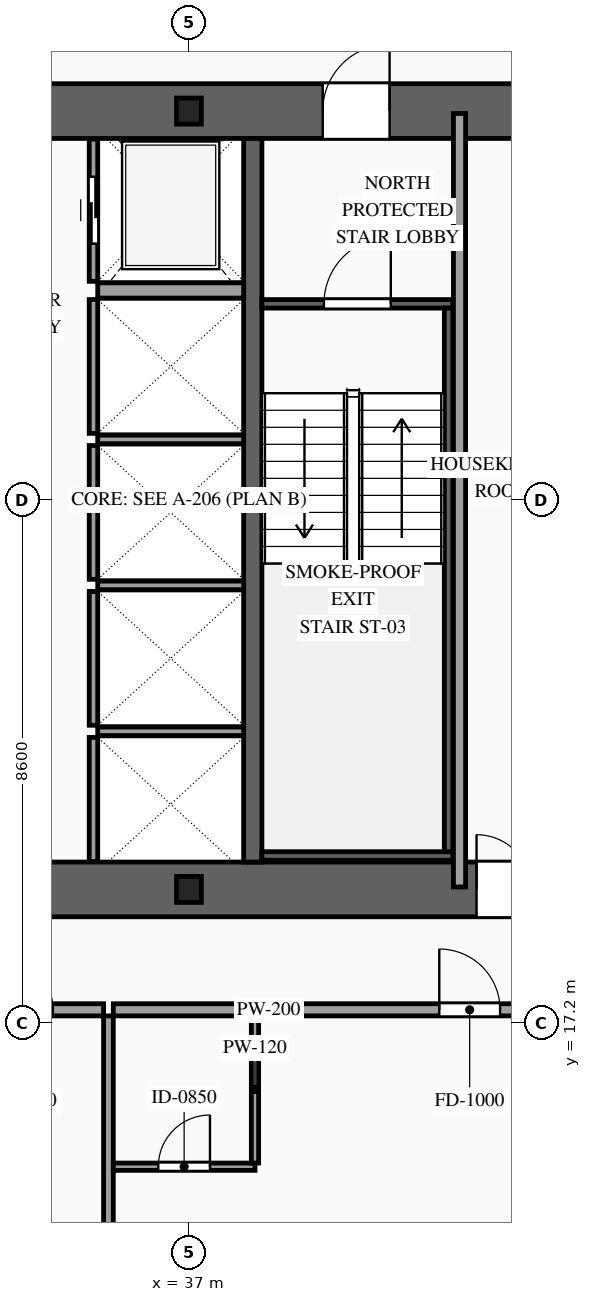
"""IFC4 building model, lengths in metres.
Left out: names, types, materials, properties, quantities, classifications, styles, units other than length and angle.
Written with IfcOpenShell. Run it as: python <this file> out.ifc"""

import sys

from ifc_helpers import new_model, si_unit, direction, frame, frame_2d, origin, origin_2d, place, context, subcontext, project, spatial, rectangle, i_section, extrude, source, transform, mapped, element, fill, save


model = new_model("IFC4")
c1 = context("Model", 3, precision=1e-05, world=origin(), true_north=direction((0.0, 1.0)))
c2 = subcontext(c1, "Body", "Model", "MODEL_VIEW")
j1 = project(units=[si_unit("LENGTHUNIT", "METRE"), si_unit("PLANEANGLEUNIT", "RADIAN")], contexts=[c1])
p1 = place(None, origin())
s1 = spatial("IfcSite", under=j1, at=p1, CompositionType="ELEMENT")
p2 = place(p1, origin())
s2 = spatial("IfcBuilding", under=s1, at=p2, CompositionType="ELEMENT")
p3 = place(p2, frame((0.0, 0.0, 64.0)))
s3 = spatial("IfcBuildingStorey", under=s2, at=p3, CompositionType="ELEMENT", Elevation=64.0)
p4 = place(p3, frame((23.35, 19.4, 0.0), z_axis=(0.0, 0.0, 1.0), x_axis=(1.0, 0.0, 0.0)))
e1 = element("IfcWall", 1, at=p4, inside=s3, PredefinedType="SHEAR", context=c2, shape_type="SweptSolid", body=[
    extrude(rectangle(XDim=27.3, YDim=0.9, at=frame_2d((13.65, 0.0))), origin(), (0.0, 0.0, 1.0), 3.6),
])
p5 = place(p4, frame((2.1, 0.0, 0.0)))
e2 = element("IfcOpeningElement", 2, at=p5, cuts=e1, PredefinedType="OPENING", context=c2, shape_type="SweptSolid", body=[
    extrude(rectangle(XDim=1.1, YDim=2.2, at=frame_2d((0.55, 1.1))), frame((0.0, 0.465, 0.0), z_axis=(0.0, -1.0, 0.0), x_axis=(1.0, 0.0, 0.0)), (0.0, 0.0, 1.0), 0.93),
])
p6 = place(p4, frame((10.0, 0.0, 0.0)))
e3 = element("IfcOpeningElement", 3, at=p6, cuts=e1, PredefinedType="OPENING", context=c2, shape_type="SweptSolid", body=[
    extrude(rectangle(XDim=1.1, YDim=2.2, at=frame_2d((0.55, 1.1))), frame((0.0, 0.465, 0.0), z_axis=(0.0, -1.0, 0.0), x_axis=(1.0, 0.0, 0.0)), (0.0, 0.0, 1.0), 0.93),
])
p7 = place(p4, frame((23.2, 0.0, 0.0)))
e4 = element("IfcOpeningElement", 4, at=p7, cuts=e1, PredefinedType="OPENING", context=c2, shape_type="SweptSolid", body=[
    extrude(rectangle(XDim=1.1, YDim=2.2, at=frame_2d((0.55, 1.1))), frame((0.0, 0.465, 0.0), z_axis=(0.0, -1.0, 0.0), x_axis=(1.0, 0.0, 0.0)), (0.0, 0.0, 1.0), 0.93),
])
p8 = place(p4, frame((19.82, 0.0, 0.0)))
e5 = element("IfcOpeningElement", 5, at=p8, cuts=e1, PredefinedType="OPENING", context=c2, shape_type="SweptSolid", body=[
    extrude(rectangle(XDim=0.9, YDim=2.15, at=frame_2d((0.45, 1.075))), frame((0.0, 0.465, 0.0), z_axis=(0.0, -1.0, 0.0), x_axis=(1.0, 0.0, 0.0)), (0.0, 0.0, 1.0), 0.93),
])
p9 = place(p4, frame((18.38, 0.0, 0.0)))
e6 = element("IfcOpeningElement", 6, at=p9, cuts=e1, PredefinedType="OPENING", context=c2, shape_type="SweptSolid", body=[
    extrude(rectangle(XDim=0.9, YDim=2.15, at=frame_2d((0.45, 1.075))), frame((0.0, 0.465, 0.0), z_axis=(0.0, -1.0, 0.0), x_axis=(1.0, 0.0, 0.0)), (0.0, 0.0, 1.0), 0.93),
])
p10 = place(p3, frame((23.35, 32.2, 0.0), z_axis=(0.0, 0.0, 1.0), x_axis=(1.0, 0.0, 0.0)))
e7 = element("IfcWall", 7, at=p10, inside=s3, PredefinedType="SHEAR", context=c2, shape_type="SweptSolid", body=[
    extrude(rectangle(XDim=27.3, YDim=0.9, at=frame_2d((13.65, 0.0))), origin(), (0.0, 0.0, 1.0), 3.6),
])
p11 = place(p10, frame((4.72, 0.0, 0.0)))
e8 = element("IfcOpeningElement", 8, at=p11, cuts=e7, PredefinedType="OPENING", context=c2, shape_type="SweptSolid", body=[
    extrude(rectangle(XDim=0.9, YDim=2.15, at=frame_2d((0.45, 1.075))), frame((0.0, 0.465, 0.0), z_axis=(0.0, -1.0, 0.0), x_axis=(1.0, 0.0, 0.0)), (0.0, 0.0, 1.0), 0.93),
])
p12 = place(p10, frame((10.0, 0.0, 0.0)))
e9 = element("IfcOpeningElement", 9, at=p12, cuts=e7, PredefinedType="OPENING", context=c2, shape_type="SweptSolid", body=[
    extrude(rectangle(XDim=1.1, YDim=2.2, at=frame_2d((0.55, 1.1))), frame((0.0, 0.465, 0.0), z_axis=(0.0, -1.0, 0.0), x_axis=(1.0, 0.0, 0.0)), (0.0, 0.0, 1.0), 0.93),
])
p13 = place(p10, frame((15.85, 0.0, 0.0)))
e10 = element("IfcOpeningElement", 10, at=p13, cuts=e7, PredefinedType="OPENING", context=c2, shape_type="SweptSolid", body=[
    extrude(rectangle(XDim=1.1, YDim=2.2, at=frame_2d((0.55, 1.1))), frame((0.0, 0.465, 0.0), z_axis=(0.0, -1.0, 0.0), x_axis=(1.0, 0.0, 0.0)), (0.0, 0.0, 1.0), 0.93),
])
p14 = place(p10, frame((19.82, 0.0, 0.0)))
e11 = element("IfcOpeningElement", 11, at=p14, cuts=e7, PredefinedType="OPENING", context=c2, shape_type="SweptSolid", body=[
    extrude(rectangle(XDim=0.9, YDim=2.15, at=frame_2d((0.45, 1.075))), frame((0.0, 0.465, 0.0), z_axis=(0.0, -1.0, 0.0), x_axis=(1.0, 0.0, 0.0)), (0.0, 0.0, 1.0), 0.93),
])
m1 = source(origin(), c2, "Body", "SweptSolid", [
    extrude(rectangle(XDim=11.9, YDim=0.3, at=frame_2d((5.95, 0.0))), origin(), (0.0, 0.0, 1.0), 3.6),
])
p15 = place(p3, frame((38.05, 19.85, 0.0), z_axis=(0.0, 0.0, 1.0), x_axis=(0.0, 1.0, 0.0)))
e12 = element("IfcWall", 12, at=p15, inside=s3, PredefinedType="SOLIDWALL", context=c2, shape_type="MappedRepresentation", body=[
    mapped(m1, transform((0.0, 0.0, 0.0), scale=1.0)),
])
m2 = source(origin(), c2, "Body", "SweptSolid", [
    extrude(i_section(OverallWidth=0.407, OverallDepth=0.428, WebThickness=0.02, FlangeThickness=0.035, at=origin_2d()), origin(), (0.0, 0.0, 1.0), 3.6),
])
for number, where, z_axis, x_axis in (
    (13, (37.0, 19.4, 0.0), (0.0, 0.0, 1.0), (1.0, 0.0, 0.0)),
    (14, (37.0, 32.2, 0.0), (0.0, 0.0, 1.0), (1.0, 0.0, 0.0)),
):
    element("IfcColumn", number, at=place(p3, frame(where, z_axis=z_axis, x_axis=x_axis)), inside=s3, PredefinedType="COLUMN", context=c2, shape_type="MappedRepresentation", body=[
        mapped(m2, transform((0.0, 0.0, 0.0), scale=1.0)),
    ])
m3 = source(origin(), c2, "Body", "SweptSolid", [
    extrude(rectangle(XDim=2.04, YDim=0.14, at=frame_2d((1.02, 0.0))), origin(), (0.0, 0.0, 1.0), 3.38),
])
p16 = place(p3, frame((35.43, 19.86, 0.0), z_axis=(0.0, 0.0, 1.0), x_axis=(0.0, 1.0, 0.0)))
e15 = element("IfcWall", 15, at=p16, inside=s3, PredefinedType="SOLIDWALL", context=c2, shape_type="MappedRepresentation", body=[
    mapped(m3, transform((0.0, 0.0, 0.0), scale=1.0)),
])
m4 = source(origin(), c2, "Body", "SweptSolid", [
    extrude(rectangle(XDim=2.4, YDim=0.14, at=frame_2d((1.2, 0.0))), origin(), (0.0, 0.0, 1.0), 3.38),
])
p17 = place(p3, frame((35.5, 22.0, 0.0), z_axis=(0.0, 0.0, 1.0), x_axis=(1.0, 0.0, 0.0)))
e16 = element("IfcWall", 16, at=p17, inside=s3, PredefinedType="SOLIDWALL", context=c2, shape_type="MappedRepresentation", body=[
    mapped(m4, transform((0.0, 0.0, 0.0), scale=1.0)),
])
m5 = source(origin(), c2, "Body", "SweptSolid", [
    extrude(rectangle(XDim=2.2, YDim=0.14, at=frame_2d((1.1, 0.0))), origin(), (0.0, 0.0, 1.0), 3.38),
])
p18 = place(p3, frame((35.43, 22.1, 0.0), z_axis=(0.0, 0.0, 1.0), x_axis=(0.0, 1.0, 0.0)))
e17 = element("IfcWall", 17, at=p18, inside=s3, PredefinedType="SOLIDWALL", context=c2, shape_type="MappedRepresentation", body=[
    mapped(m5, transform((0.0, 0.0, 0.0), scale=1.0)),
])
p19 = place(p3, frame((35.5, 24.4, 0.0), z_axis=(0.0, 0.0, 1.0), x_axis=(1.0, 0.0, 0.0)))
e18 = element("IfcWall", 18, at=p19, inside=s3, PredefinedType="SOLIDWALL", context=c2, shape_type="MappedRepresentation", body=[
    mapped(m4, transform((0.0, 0.0, 0.0), scale=1.0)),
])
p20 = place(p3, frame((35.43, 24.5, 0.0), z_axis=(0.0, 0.0, 1.0), x_axis=(0.0, 1.0, 0.0)))
e19 = element("IfcWall", 19, at=p20, inside=s3, PredefinedType="SOLIDWALL", context=c2, shape_type="MappedRepresentation", body=[
    mapped(m5, transform((0.0, 0.0, 0.0), scale=1.0)),
])
p21 = place(p3, frame((35.5, 26.8, 0.0), z_axis=(0.0, 0.0, 1.0), x_axis=(1.0, 0.0, 0.0)))
e20 = element("IfcWall", 20, at=p21, inside=s3, PredefinedType="SOLIDWALL", context=c2, shape_type="MappedRepresentation", body=[
    mapped(m4, transform((0.0, 0.0, 0.0), scale=1.0)),
])
m6 = source(origin(), c2, "Body", "SweptSolid", [
    extrude(rectangle(XDim=2.2, YDim=0.14, at=frame_2d((1.1, 0.0))), origin(), (0.0, 0.0, 1.0), 3.38),
])
p22 = place(p3, frame((35.43, 26.9, 0.0), z_axis=(0.0, 0.0, 1.0), x_axis=(0.0, 1.0, 0.0)))
e21 = element("IfcWall", 21, at=p22, inside=s3, PredefinedType="SOLIDWALL", context=c2, shape_type="MappedRepresentation", body=[
    mapped(m6, transform((0.0, 0.0, 0.0), scale=1.0)),
])
p23 = place(p3, frame((35.43, 29.4, 0.0), z_axis=(0.0, 0.0, 1.0), x_axis=(0.0, 1.0, 0.0)))
e22 = element("IfcWall", 22, at=p23, inside=s3, PredefinedType="SOLIDWALL", context=c2, shape_type="SweptSolid", body=[
    extrude(rectangle(XDim=2.34, YDim=0.14, at=frame_2d((1.17, 0.0))), origin(), (0.0, 0.0, 1.0), 3.38),
])
p24 = place(p23, frame((0.62, 0.0, 0.0)))
e23 = element("IfcOpeningElement", 23, at=p24, cuts=e22, PredefinedType="OPENING", context=c2, shape_type="SweptSolid", body=[
    extrude(rectangle(XDim=1.1, YDim=2.2, at=frame_2d((0.55, 1.1))), frame((0.0, 0.085, 0.0), z_axis=(0.0, -1.0, 0.0), x_axis=(1.0, 0.0, 0.0)), (0.0, 0.0, 1.0), 0.17),
])
m7 = source(origin(), c2, "Body", "SweptSolid", [
    extrude(rectangle(XDim=2.4, YDim=0.25, at=frame_2d((1.2, 0.0))), origin(), (0.0, 0.0, 1.0), 3.38),
])
p25 = place(p3, frame((35.5, 29.25, 0.0), z_axis=(0.0, 0.0, 1.0), x_axis=(1.0, 0.0, 0.0)))
e24 = element("IfcWall", 24, at=p25, inside=s3, PredefinedType="SOLIDWALL", context=c2, shape_type="MappedRepresentation", body=[
    mapped(m7, transform((0.0, 0.0, 0.0), scale=1.0)),
])
p26 = place(p3, frame((38.2, 29.03, 0.0), z_axis=(0.0, 0.0, 1.0), x_axis=(1.0, 0.0, 0.0)))
e25 = element("IfcWall", 25, at=p26, inside=s3, PredefinedType="SOLIDWALL", context=c2, shape_type="SweptSolid", body=[
    extrude(rectangle(XDim=3.14, YDim=0.14, at=frame_2d((1.57, 0.0))), origin(), (0.0, 0.0, 1.0), 3.38),
])
p27 = place(p26, frame((1.02, 0.0, 0.0)))
e26 = element("IfcOpeningElement", 26, at=p27, cuts=e25, PredefinedType="OPENING", context=c2, shape_type="SweptSolid", body=[
    extrude(rectangle(XDim=1.1, YDim=2.2, at=frame_2d((0.55, 1.1))), frame((0.0, 0.085, 0.0), z_axis=(0.0, -1.0, 0.0), x_axis=(1.0, 0.0, 0.0)), (0.0, 0.0, 1.0), 0.17),
])
m8 = source(origin(), c2, "Body", "SweptSolid", [
    extrude(rectangle(XDim=3.14, YDim=0.14, at=frame_2d((1.57, 0.0))), origin(), (0.0, 0.0, 1.0), 3.38),
])
p28 = place(p3, frame((38.2, 19.95, 0.0), z_axis=(0.0, 0.0, 1.0), x_axis=(1.0, 0.0, 0.0)))
e27 = element("IfcWall", 27, at=p28, inside=s3, PredefinedType="SOLIDWALL", context=c2, shape_type="MappedRepresentation", body=[
    mapped(m8, transform((0.0, 0.0, 0.0), scale=1.0)),
])
m9 = source(origin(), c2, "Body", "SweptSolid", [
    extrude(rectangle(XDim=8.94, YDim=0.14, at=frame_2d((4.47, 0.0))), origin(), (0.0, 0.0, 1.0), 3.38),
])
p29 = place(p3, frame((41.27, 20.02, 0.0), z_axis=(0.0, 0.0, 1.0), x_axis=(0.0, 1.0, 0.0)))
e28 = element("IfcWall", 28, at=p29, inside=s3, PredefinedType="SOLIDWALL", context=c2, shape_type="MappedRepresentation", body=[
    mapped(m9, transform((0.0, 0.0, 0.0), scale=1.0)),
])
m10 = source(origin(), c2, "Body", "SweptSolid", [
    extrude(rectangle(XDim=12.72, YDim=0.2, at=frame_2d((6.36, 0.0))), origin(), (0.0, 0.0, 1.0), 3.38),
])
p30 = place(p3, frame((41.45, 19.44, 0.0), z_axis=(0.0, 0.0, 1.0), x_axis=(0.0, 1.0, 0.0)))
e29 = element("IfcWall", 29, at=p30, inside=s3, PredefinedType="PARTITIONING", context=c2, shape_type="MappedRepresentation", body=[
    mapped(m10, transform((0.0, 0.0, 0.0), scale=1.0)),
])
p31 = place(p3, frame((30.521, 17.42, 0.0), z_axis=(0.0, 0.0, 1.0), x_axis=(1.0, 0.0, 0.0)))
e30 = element("IfcWall", 30, at=p31, inside=s3, PredefinedType="PARTITIONING", context=c2, shape_type="SweptSolid", body=[
    extrude(rectangle(XDim=5.075, YDim=0.2, at=frame_2d((2.538, 0.0))), origin(), (0.0, 0.0, 1.0), 3.38),
])
p32 = place(p31, frame((3.242, 0.0, 0.0)))
e31 = element("IfcOpeningElement", 31, at=p32, cuts=e30, PredefinedType="OPENING", context=c2, shape_type="SweptSolid", body=[
    extrude(rectangle(XDim=1.0, YDim=2.2, at=frame_2d((0.5, 1.1))), frame((0.0, 0.115, 0.0), z_axis=(0.0, -1.0, 0.0), x_axis=(1.0, 0.0, 0.0)), (0.0, 0.0, 1.0), 0.23),
])
m11 = source(origin(), c2, "Body", "SweptSolid", [
    extrude(rectangle(XDim=16.47, YDim=0.16, at=frame_2d((8.235, 0.0))), origin(), (0.0, 0.0, 1.0), 3.38),
])
p33 = place(p3, frame((35.676, 0.85, 0.0), z_axis=(0.0, 0.0, 1.0), x_axis=(0.0, 1.0, 0.0)))
e32 = element("IfcWall", 32, at=p33, inside=s3, PredefinedType="PARTITIONING", context=c2, shape_type="MappedRepresentation", body=[
    mapped(m11, transform((0.0, 0.0, 0.0), scale=1.0)),
])
p34 = place(p3, frame((35.756, 17.42, 0.0), z_axis=(0.0, 0.0, 1.0), x_axis=(1.0, 0.0, 0.0)))
e33 = element("IfcWall", 33, at=p34, inside=s3, PredefinedType="PARTITIONING", context=c2, shape_type="SweptSolid", body=[
    extrude(rectangle(XDim=9.311, YDim=0.2, at=frame_2d((4.655, 0.0))), origin(), (0.0, 0.0, 1.0), 3.38),
])
p35 = place(p34, frame((5.361, 0.0, 0.0)))
e34 = element("IfcOpeningElement", 34, at=p35, cuts=e33, PredefinedType="OPENING", context=c2, shape_type="SweptSolid", body=[
    extrude(rectangle(XDim=1.0, YDim=2.2, at=frame_2d((0.5, 1.1))), frame((0.0, 0.115, 0.0), z_axis=(0.0, -1.0, 0.0), x_axis=(1.0, 0.0, 0.0)), (0.0, 0.0, 1.0), 0.23),
])
p36 = place(p3, frame((35.756, 14.84, 0.0), z_axis=(0.0, 0.0, 1.0), x_axis=(1.0, 0.0, 0.0)))
e35 = element("IfcWall", 35, at=p36, inside=s3, PredefinedType="PARTITIONING", context=c2, shape_type="SweptSolid", body=[
    extrude(rectangle(XDim=2.33, YDim=0.12, at=frame_2d((1.165, 0.0))), origin(), (0.0, 0.0, 1.0), 3.38),
])
p37 = place(p36, frame((0.74, 0.0, 0.0)))
e36 = element("IfcOpeningElement", 36, at=p37, cuts=e35, PredefinedType="OPENING", context=c2, shape_type="SweptSolid", body=[
    extrude(rectangle(XDim=0.85, YDim=2.1, at=frame_2d((0.425, 1.05))), frame((0.0, 0.075, 0.0), z_axis=(0.0, -1.0, 0.0), x_axis=(1.0, 0.0, 0.0)), (0.0, 0.0, 1.0), 0.15),
])
m12 = source(origin(), c2, "Body", "SweptSolid", [
    extrude(rectangle(XDim=2.42, YDim=0.12, at=frame_2d((1.21, 0.0))), origin(), (0.0, 0.0, 1.0), 3.38),
])
p38 = place(p3, frame((38.086, 14.9, 0.0), z_axis=(0.0, 0.0, 1.0), x_axis=(0.0, 1.0, 0.0)))
e37 = element("IfcWall", 37, at=p38, inside=s3, PredefinedType="PARTITIONING", context=c2, shape_type="MappedRepresentation", body=[
    mapped(m12, transform((0.0, 0.0, 0.0), scale=1.0)),
])
m13 = source(origin(), c2, "Body", "SweptSolid", [
    extrude(rectangle(XDim=1.1, YDim=2.2, at=frame_2d((0.55, 1.1))), frame((0.0, 0.025, 0.0), z_axis=(0.0, -1.0, 0.0), x_axis=(1.0, 0.0, 0.0)), (0.0, 0.0, 1.0), 0.05),
])
p39 = place(p24, origin())
e38 = element("IfcDoor", 38, at=p39, inside=s3, OperationType="SLIDING_TO_RIGHT", PredefinedType="DOOR", context=c2, shape_type="MappedRepresentation", body=[
    mapped(m13, transform((0.0, 0.0, 0.0), scale=1.0)),
])
fill(e23, e38)
m14 = source(origin(), c2, "Body", "SweptSolid", [
    extrude(rectangle(XDim=1.1, YDim=2.2, at=frame_2d((0.55, 1.1))), frame((0.0, 0.025, 0.0), z_axis=(0.0, -1.0, 0.0), x_axis=(1.0, 0.0, 0.0)), (0.0, 0.0, 1.0), 0.05),
])
p40 = place(p27, origin())
e39 = element("IfcDoor", 39, at=p40, inside=s3, OperationType="SINGLE_SWING_RIGHT", PredefinedType="DOOR", context=c2, shape_type="MappedRepresentation", body=[
    mapped(m14, transform((0.0, 0.0, 0.0), scale=1.0)),
])
fill(e26, e39)
p41 = place(p13, origin())
e40 = element("IfcDoor", 40, at=p41, inside=s3, OperationType="SINGLE_SWING_RIGHT", PredefinedType="DOOR", context=c2, shape_type="MappedRepresentation", body=[
    mapped(m14, transform((0.0, 0.0, 0.0), scale=1.0)),
])
fill(e10, e40)
m15 = source(origin(), c2, "Body", "SweptSolid", [
    extrude(rectangle(XDim=0.9, YDim=2.15, at=frame_2d((0.45, 1.075))), frame((0.0, 0.025, 0.0), z_axis=(0.0, -1.0, 0.0), x_axis=(1.0, 0.0, 0.0)), (0.0, 0.0, 1.0), 0.05),
])
p42 = place(p9, origin())
e41 = element("IfcDoor", 41, at=p42, inside=s3, OperationType="SINGLE_SWING_LEFT", PredefinedType="DOOR", context=c2, shape_type="MappedRepresentation", body=[
    mapped(m15, transform((0.0, 0.0, 0.0), scale=1.0)),
])
fill(e6, e41)
m16 = source(origin(), c2, "Body", "SweptSolid", [
    extrude(rectangle(XDim=1.0, YDim=2.2, at=frame_2d((0.5, 1.1))), frame((0.0, 0.025, 0.0), z_axis=(0.0, -1.0, 0.0), x_axis=(1.0, 0.0, 0.0)), (0.0, 0.0, 1.0), 0.05),
])
p43 = place(p32, origin())
e42 = element("IfcDoor", 42, at=p43, inside=s3, OperationType="SINGLE_SWING_LEFT", PredefinedType="DOOR", context=c2, shape_type="MappedRepresentation", body=[
    mapped(m16, transform((0.0, 0.0, 0.0), scale=1.0)),
])
fill(e31, e42)
p44 = place(p35, origin())
e43 = element("IfcDoor", 43, at=p44, inside=s3, OperationType="SINGLE_SWING_LEFT", PredefinedType="DOOR", context=c2, shape_type="MappedRepresentation", body=[
    mapped(m16, transform((0.0, 0.0, 0.0), scale=1.0)),
])
fill(e34, e43)
m17 = source(origin(), c2, "Body", "SweptSolid", [
    extrude(rectangle(XDim=0.85, YDim=2.1, at=frame_2d((0.425, 1.05))), frame((0.0, 0.025, 0.0), z_axis=(0.0, -1.0, 0.0), x_axis=(1.0, 0.0, 0.0)), (0.0, 0.0, 1.0), 0.05),
])
p45 = place(p37, origin())
e44 = element("IfcDoor", 44, at=p45, inside=s3, OperationType="SINGLE_SWING_RIGHT", PredefinedType="DOOR", context=c2, shape_type="MappedRepresentation", body=[
    mapped(m17, transform((0.0, 0.0, 0.0), scale=1.0)),
])
fill(e36, e44)
save(model, sys.argv[1])
